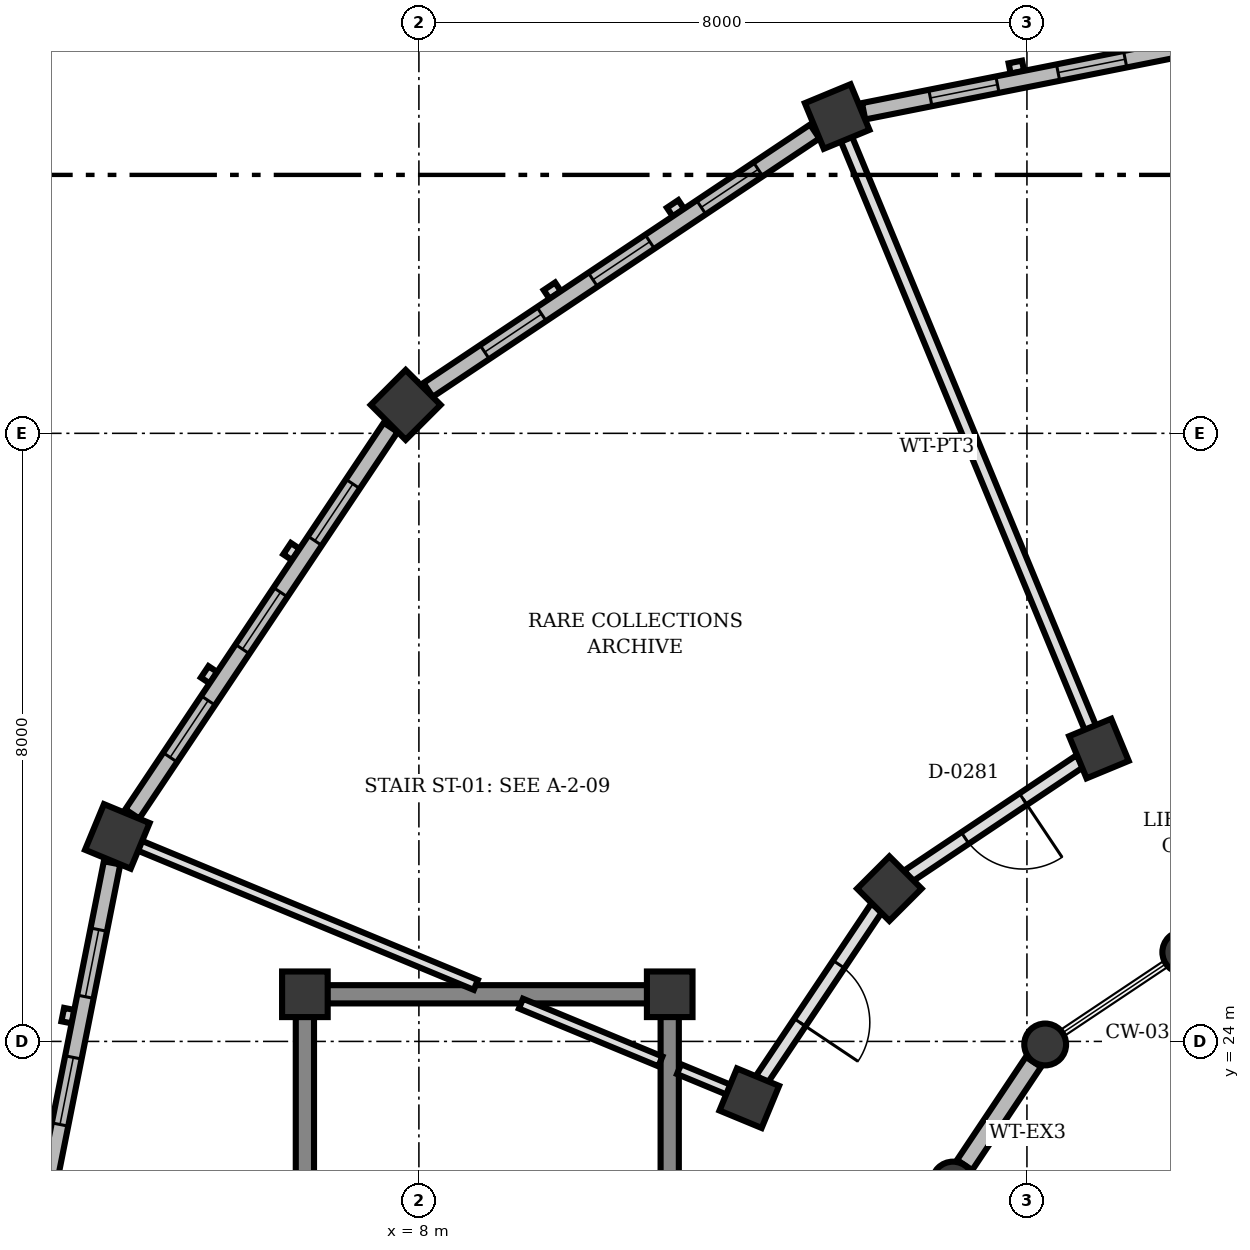
"""IFC4 building model, lengths in metres.
Left out: names, types, materials, properties, quantities, classifications, styles, units other than length and angle.
Written with IfcOpenShell. Run it as: python <this file> out.ifc"""

import sys

from ifc_helpers import new_model, si_unit, direction, frame, frame_2d, origin, origin_2d, place, context, subcontext, project, spatial, rectangle, circle, extrude, element, fill, save


model = new_model("IFC4")
c1 = context("Model", 3, precision=1e-05, world=origin(), true_north=direction((0.0, 1.0)))
c2 = subcontext(c1, "Body", "Model", "MODEL_VIEW")
j1 = project(units=[si_unit("LENGTHUNIT", "METRE"), si_unit("PLANEANGLEUNIT", "RADIAN")], contexts=[c1])
p1 = place(None, origin())
s1 = spatial("IfcSite", under=j1, at=p1, CompositionType="ELEMENT")
p2 = place(p1, origin())
s2 = spatial("IfcBuilding", under=s1, at=p2, CompositionType="ELEMENT")
p3 = place(p2, origin())
s3 = spatial("IfcBuildingStorey", under=s2, at=p3, CompositionType="ELEMENT", Elevation=0.0)
for number, where, z_axis, x_axis in (
    (1, (11.3, 24.62, 0.0), (0.0, 0.0, 1.0), (1.0, 0.0, 0.0)),
    (2, (6.5, 24.62, 0.0), (0.0, 0.0, 1.0), (1.0, 0.0, 0.0)),
):
    element("IfcColumn", number, at=place(p3, frame(where, z_axis=z_axis, x_axis=x_axis)), inside=s3, PredefinedType="COLUMN", context=c2, shape_type="SweptSolid", body=[
        extrude(rectangle(XDim=0.6, YDim=0.6, at=origin_2d()), origin(), (0.0, 0.0, 1.0), 4.5),
    ])
for number, where, z_axis, x_axis in (
    (3, (18.057, 25.174, 0.0), (0.0, 0.0, 1.0), (1.0, 0.0, 0.0)),
    (4, (16.24, 23.96, 0.0), (0.0, 0.0, 1.0), (1.0, 0.0, 0.0)),
    (5, (15.026, 22.143, 0.0), (0.0, 0.0, 1.0), (1.0, 0.0, 0.0)),
):
    element("IfcColumn", number, at=place(p3, frame(where, z_axis=z_axis, x_axis=x_axis)), inside=s3, PredefinedType="COLUMN", context=c2, shape_type="SweptSolid", body=[
        extrude(circle(Radius=0.275, at=origin_2d()), origin(), (0.0, 0.0, 1.0), 4.5),
    ])
for number, where, z_axis, x_axis in (
    (6, (16.947, 27.853, 0.0), (0.0, 0.0, 1.0), (-0.383, 0.924, 0.0)),
    (7, (14.19, 26.01, 0.0), (0.0, 0.0, 1.0), (-0.707, 0.707, 0.0)),
    (8, (12.347, 23.253, 0.0), (0.0, 0.0, 1.0), (-0.924, 0.383, 0.0)),
):
    element("IfcColumn", number, at=place(p3, frame(where, z_axis=z_axis, x_axis=x_axis)), inside=s3, PredefinedType="COLUMN", context=c2, shape_type="SweptSolid", body=[
        extrude(rectangle(XDim=0.6, YDim=0.6, at=origin_2d()), origin(), (0.0, 0.0, 1.0), 4.5),
    ])
for number, where, z_axis, x_axis in (
    (9, (13.503, 36.168, 0.0), (0.0, 0.0, 1.0), (-0.383, 0.924, 0.0)),
    (10, (7.826, 32.374, 0.0), (0.0, 0.0, 1.0), (-0.707, 0.707, 0.0)),
    (11, (4.032, 26.697, 0.0), (0.0, 0.0, 1.0), (-0.924, 0.383, 0.0)),
):
    element("IfcColumn", number, at=place(p3, frame(where, z_axis=z_axis, x_axis=x_axis)), inside=s3, PredefinedType="COLUMN", context=c2, shape_type="SweptSolid", body=[
        extrude(rectangle(XDim=0.65, YDim=0.65, at=origin_2d()), origin(), (0.0, 0.0, 1.0), 4.5),
    ])
p4 = place(p3, frame((13.851, 36.237, 0.0), z_axis=(0.0, 0.0, 1.0), x_axis=(0.98077967596, 0.19511849534, 0.0)))
e12 = element("IfcWall", 12, at=p4, inside=s3, PredefinedType="SOLIDWALL", context=c2, shape_type="SweptSolid", body=[
    extrude(rectangle(XDim=6.119, YDim=0.22, at=frame_2d((3.059, 0.0))), origin(), (0.0, 0.0, 1.0), 3.55),
])
p5 = place(p4, frame((0.896, 0.0, 0.85)))
e13 = element("IfcOpeningElement", 13, at=p5, cuts=e12, PredefinedType="OPENING", context=c2, shape_type="SweptSolid", body=[
    extrude(rectangle(XDim=0.9, YDim=1.4, at=frame_2d((0.45, 0.7))), frame((0.0, 0.12, 0.0), z_axis=(0.0, -1.0, 0.0), x_axis=(1.0, 0.0, 0.0)), (0.0, 0.0, 1.0), 0.24),
])
p6 = place(p4, frame((2.609, 0.0, 0.85)))
e14 = element("IfcOpeningElement", 14, at=p6, cuts=e12, PredefinedType="OPENING", context=c2, shape_type="SweptSolid", body=[
    extrude(rectangle(XDim=0.9, YDim=1.4, at=frame_2d((0.45, 0.7))), frame((0.0, 0.12, 0.0), z_axis=(0.0, -1.0, 0.0), x_axis=(1.0, 0.0, 0.0)), (0.0, 0.0, 1.0), 0.24),
])
p7 = place(p4, frame((4.323, 0.0, 0.85)))
e15 = element("IfcOpeningElement", 15, at=p7, cuts=e12, PredefinedType="OPENING", context=c2, shape_type="SweptSolid", body=[
    extrude(rectangle(XDim=0.9, YDim=1.4, at=frame_2d((0.45, 0.7))), frame((0.0, 0.12, 0.0), z_axis=(0.0, -1.0, 0.0), x_axis=(1.0, 0.0, 0.0)), (0.0, 0.0, 1.0), 0.24),
])
p8 = place(p3, frame((8.121, 32.571, 0.0), z_axis=(0.0, 0.0, 1.0), x_axis=(0.83139901156, 0.555675879967, 0.0)))
e16 = element("IfcWall", 16, at=p8, inside=s3, PredefinedType="SOLIDWALL", context=c2, shape_type="SweptSolid", body=[
    extrude(rectangle(XDim=6.118, YDim=0.22, at=frame_2d((3.059, 0.0))), origin(), (0.0, 0.0, 1.0), 3.55),
])
p9 = place(p8, frame((0.896, 0.0, 0.85)))
e17 = element("IfcOpeningElement", 17, at=p9, cuts=e16, PredefinedType="OPENING", context=c2, shape_type="SweptSolid", body=[
    extrude(rectangle(XDim=0.9, YDim=1.4, at=frame_2d((0.45, 0.7))), frame((0.0, 0.12, 0.0), z_axis=(0.0, -1.0, 0.0), x_axis=(1.0, 0.0, 0.0)), (0.0, 0.0, 1.0), 0.24),
])
p10 = place(p8, frame((2.609, 0.0, 0.85)))
e18 = element("IfcOpeningElement", 18, at=p10, cuts=e16, PredefinedType="OPENING", context=c2, shape_type="SweptSolid", body=[
    extrude(rectangle(XDim=0.9, YDim=1.4, at=frame_2d((0.45, 0.7))), frame((0.0, 0.12, 0.0), z_axis=(0.0, -1.0, 0.0), x_axis=(1.0, 0.0, 0.0)), (0.0, 0.0, 1.0), 0.24),
])
p11 = place(p8, frame((4.323, 0.0, 0.85)))
e19 = element("IfcOpeningElement", 19, at=p11, cuts=e16, PredefinedType="OPENING", context=c2, shape_type="SweptSolid", body=[
    extrude(rectangle(XDim=0.9, YDim=1.4, at=frame_2d((0.45, 0.7))), frame((0.0, 0.12, 0.0), z_axis=(0.0, -1.0, 0.0), x_axis=(1.0, 0.0, 0.0)), (0.0, 0.0, 1.0), 0.24),
])
p12 = place(p3, frame((4.229, 26.992, 0.0), z_axis=(0.0, 0.0, 1.0), x_axis=(0.555657446161, 0.831411331728, 0.0)))
e20 = element("IfcWall", 20, at=p12, inside=s3, PredefinedType="SOLIDWALL", context=c2, shape_type="SweptSolid", body=[
    extrude(rectangle(XDim=6.119, YDim=0.22, at=frame_2d((3.059, 0.0))), origin(), (0.0, 0.0, 1.0), 3.55),
])
p13 = place(p12, frame((0.896, 0.0, 0.85)))
e21 = element("IfcOpeningElement", 21, at=p13, cuts=e20, PredefinedType="OPENING", context=c2, shape_type="SweptSolid", body=[
    extrude(rectangle(XDim=0.9, YDim=1.4, at=frame_2d((0.45, 0.7))), frame((0.0, 0.12, 0.0), z_axis=(0.0, -1.0, 0.0), x_axis=(1.0, 0.0, 0.0)), (0.0, 0.0, 1.0), 0.24),
])
p14 = place(p12, frame((2.609, 0.0, 0.85)))
e22 = element("IfcOpeningElement", 22, at=p14, cuts=e20, PredefinedType="OPENING", context=c2, shape_type="SweptSolid", body=[
    extrude(rectangle(XDim=0.9, YDim=1.4, at=frame_2d((0.45, 0.7))), frame((0.0, 0.12, 0.0), z_axis=(0.0, -1.0, 0.0), x_axis=(1.0, 0.0, 0.0)), (0.0, 0.0, 1.0), 0.24),
])
p15 = place(p12, frame((4.323, 0.0, 0.85)))
e23 = element("IfcOpeningElement", 23, at=p15, cuts=e20, PredefinedType="OPENING", context=c2, shape_type="SweptSolid", body=[
    extrude(rectangle(XDim=0.9, YDim=1.4, at=frame_2d((0.45, 0.7))), frame((0.0, 0.12, 0.0), z_axis=(0.0, -1.0, 0.0), x_axis=(1.0, 0.0, 0.0)), (0.0, 0.0, 1.0), 0.24),
])
p16 = place(p3, frame((16.086, 23.73, 0.0), z_axis=(0.0, 0.0, 1.0), x_axis=(-0.555287078904, -0.83165874011, 0.0)))
e24 = element("IfcWall", 24, at=p16, inside=s3, PredefinedType="SOLIDWALL", context=c2, shape_type="SweptSolid", body=[
    extrude(rectangle(XDim=1.632, YDim=0.24, at=frame_2d((0.816, 0.0))), origin(), (0.0, 0.0, 1.0), 3.55),
])
p17 = place(p3, frame((2.769, 20.348, 0.0), z_axis=(0.0, 0.0, 1.0), x_axis=(0.195110859746, 0.980781194971, 0.0)))
e25 = element("IfcWall", 25, at=p17, inside=s3, PredefinedType="SOLIDWALL", context=c2, shape_type="SweptSolid", body=[
    extrude(rectangle(XDim=6.119, YDim=0.22, at=frame_2d((3.06, 0.0))), origin(), (0.0, 0.0, 1.0), 3.55),
])
p18 = place(p17, frame((0.896, 0.0, 0.85)))
e26 = element("IfcOpeningElement", 26, at=p18, cuts=e25, PredefinedType="OPENING", context=c2, shape_type="SweptSolid", body=[
    extrude(rectangle(XDim=0.9, YDim=1.4, at=frame_2d((0.45, 0.7))), frame((0.0, 0.12, 0.0), z_axis=(0.0, -1.0, 0.0), x_axis=(1.0, 0.0, 0.0)), (0.0, 0.0, 1.0), 0.24),
])
p19 = place(p17, frame((2.609, 0.0, 0.85)))
e27 = element("IfcOpeningElement", 27, at=p19, cuts=e25, PredefinedType="OPENING", context=c2, shape_type="SweptSolid", body=[
    extrude(rectangle(XDim=0.9, YDim=1.4, at=frame_2d((0.45, 0.7))), frame((0.0, 0.12, 0.0), z_axis=(0.0, -1.0, 0.0), x_axis=(1.0, 0.0, 0.0)), (0.0, 0.0, 1.0), 0.24),
])
p20 = place(p17, frame((4.323, 0.0, 0.85)))
e28 = element("IfcOpeningElement", 28, at=p20, cuts=e25, PredefinedType="OPENING", context=c2, shape_type="SweptSolid", body=[
    extrude(rectangle(XDim=0.9, YDim=1.4, at=frame_2d((0.45, 0.7))), frame((0.0, 0.12, 0.0), z_axis=(0.0, -1.0, 0.0), x_axis=(1.0, 0.0, 0.0)), (0.0, 0.0, 1.0), 0.24),
])
p21 = place(p3, frame((6.5, 16.192, 0.0), z_axis=(0.0, 0.0, 1.0), x_axis=(0.0, 1.0, 0.0)))
e29 = element("IfcWall", 29, at=p21, inside=s3, PredefinedType="SHEAR", context=c2, shape_type="SweptSolid", body=[
    extrude(rectangle(XDim=8.136, YDim=0.24, at=frame_2d((4.068, 0.0))), origin(), (0.0, 0.0, 1.0), 4.24),
])
p22 = place(p3, frame((11.3, 24.328, 0.0), z_axis=(0.0, 0.0, 1.0), x_axis=(0.0, -1.0, 0.0)))
e30 = element("IfcWall", 30, at=p22, inside=s3, PredefinedType="SHEAR", context=c2, shape_type="SweptSolid", body=[
    extrude(rectangle(XDim=8.136, YDim=0.24, at=frame_2d((4.068, 0.0))), origin(), (0.0, 0.0, 1.0), 4.24),
])
p23 = place(p22, frame((6.244, 0.0, 0.0)))
e31 = element("IfcOpeningElement", 31, at=p23, cuts=e30, PredefinedType="OPENING", context=c2, shape_type="SweptSolid", body=[
    extrude(rectangle(XDim=0.88, YDim=2.1, at=frame_2d((0.44, 1.05))), frame((0.0, 0.13, 0.0), z_axis=(0.0, -1.0, 0.0), x_axis=(1.0, 0.0, 0.0)), (0.0, 0.0, 1.0), 0.26),
])
p24 = place(p3, frame((11.008, 24.62, 0.0), z_axis=(0.0, 0.0, 1.0), x_axis=(-1.0, 0.0, 0.0)))
e32 = element("IfcWall", 32, at=p24, inside=s3, PredefinedType="SHEAR", context=c2, shape_type="SweptSolid", body=[
    extrude(rectangle(XDim=4.216, YDim=0.24, at=frame_2d((2.108, 0.0))), origin(), (0.0, 0.0, 1.0), 4.24),
])
p25 = place(p3, frame((16.836, 28.123, 0.0), z_axis=(0.0, 0.0, 1.0), x_axis=(-0.382780060664, 0.923839501839, 0.0)))
e33 = element("IfcWall", 33, at=p25, inside=s3, PredefinedType="PARTITIONING", context=c2, shape_type="SweptSolid", body=[
    extrude(rectangle(XDim=8.391, YDim=0.16, at=frame_2d((4.196, 0.0))), origin(), (0.0, 0.0, 1.0), 3.552),
])
p26 = place(p3, frame((12.077, 23.364, 0.0), z_axis=(0.0, 0.0, 1.0), x_axis=(-0.923789734747, 0.382900151445, 0.0)))
e34 = element("IfcWall", 34, at=p26, inside=s3, PredefinedType="PARTITIONING", context=c2, shape_type="SweptSolid", body=[
    extrude(rectangle(XDim=0.708, YDim=0.14, at=frame_2d((0.354, 0.0))), origin(), (0.0, 0.0, 1.0), 4.2),
])
p27 = place(p3, frame((11.177, 23.737, 0.0), z_axis=(0.0, 0.0, 1.0), x_axis=(-0.923817443679, 0.382833293686, 0.0)))
e35 = element("IfcWall", 35, at=p27, inside=s3, PredefinedType="PARTITIONING", context=c2, shape_type="SweptSolid", body=[
    extrude(rectangle(XDim=1.985, YDim=0.14, at=frame_2d((0.993, 0.0))), origin(), (0.0, 0.0, 1.0), 4.2),
])
p28 = place(p3, frame((8.749, 24.743, 0.0), z_axis=(0.0, 0.0, 1.0), x_axis=(-0.923842829076, 0.38277203028, 0.0)))
e36 = element("IfcWall", 36, at=p28, inside=s3, PredefinedType="PARTITIONING", context=c2, shape_type="SweptSolid", body=[
    extrude(rectangle(XDim=4.789, YDim=0.14, at=frame_2d((2.395, 0.0))), origin(), (0.0, 0.0, 1.0), 4.2),
])
p29 = place(p3, frame((16.699, 27.688, 0.0), z_axis=(0.0, 0.0, 1.0), x_axis=(-0.831096426298, -0.556128339679, 0.0)))
e37 = element("IfcWall", 37, at=p29, inside=s3, PredefinedType="PARTITIONING", context=c2, shape_type="SweptSolid", body=[
    extrude(rectangle(XDim=2.72, YDim=0.18, at=frame_2d((1.36, 0.0))), origin(), (0.0, 0.0, 1.0), 3.552),
])
p30 = place(p29, frame((0.9, 0.0, 0.0)))
e38 = element("IfcOpeningElement", 38, at=p30, cuts=e37, PredefinedType="OPENING", context=c2, shape_type="SweptSolid", body=[
    extrude(rectangle(XDim=0.92, YDim=2.1, at=frame_2d((0.46, 1.05))), frame((0.0, 0.1, 0.0), z_axis=(0.0, -1.0, 0.0), x_axis=(1.0, 0.0, 0.0)), (0.0, 0.0, 1.0), 0.2),
])
p31 = place(p3, frame((14.025, 25.762, 0.0), z_axis=(0.0, 0.0, 1.0), x_axis=(-0.556128339679, -0.831096426298, 0.0)))
e39 = element("IfcWall", 39, at=p31, inside=s3, PredefinedType="PARTITIONING", context=c2, shape_type="SweptSolid", body=[
    extrude(rectangle(XDim=2.72, YDim=0.18, at=frame_2d((1.36, 0.0))), origin(), (0.0, 0.0, 1.0), 3.552),
])
p32 = place(p31, frame((0.9, 0.0, 0.0)))
e40 = element("IfcOpeningElement", 40, at=p32, cuts=e39, PredefinedType="OPENING", context=c2, shape_type="SweptSolid", body=[
    extrude(rectangle(XDim=0.92, YDim=2.1, at=frame_2d((0.46, 1.05))), frame((0.0, 0.1, 0.0), z_axis=(0.0, -1.0, 0.0), x_axis=(1.0, 0.0, 0.0)), (0.0, 0.0, 1.0), 0.2),
])
p33 = place(p5, origin())
e41 = element("IfcWindow", 41, at=p33, inside=s3, PartitioningType="SINGLE_PANEL", PredefinedType="WINDOW", context=c2, shape_type="SweptSolid", body=[
    extrude(rectangle(XDim=0.9, YDim=1.4, at=frame_2d((0.45, 0.7))), frame((0.0, 0.03, 0.0), z_axis=(0.0, -1.0, 0.0), x_axis=(1.0, 0.0, 0.0)), (0.0, 0.0, 1.0), 0.06),
])
fill(e13, e41)
p34 = place(p6, origin())
e42 = element("IfcWindow", 42, at=p34, inside=s3, PartitioningType="SINGLE_PANEL", PredefinedType="WINDOW", context=c2, shape_type="SweptSolid", body=[
    extrude(rectangle(XDim=0.9, YDim=1.4, at=frame_2d((0.45, 0.7))), frame((0.0, 0.03, 0.0), z_axis=(0.0, -1.0, 0.0), x_axis=(1.0, 0.0, 0.0)), (0.0, 0.0, 1.0), 0.06),
])
fill(e14, e42)
p35 = place(p9, origin())
e43 = element("IfcWindow", 43, at=p35, inside=s3, PartitioningType="SINGLE_PANEL", PredefinedType="WINDOW", context=c2, shape_type="SweptSolid", body=[
    extrude(rectangle(XDim=0.9, YDim=1.4, at=frame_2d((0.45, 0.7))), frame((0.0, 0.03, 0.0), z_axis=(0.0, -1.0, 0.0), x_axis=(1.0, 0.0, 0.0)), (0.0, 0.0, 1.0), 0.06),
])
fill(e17, e43)
p36 = place(p10, origin())
e44 = element("IfcWindow", 44, at=p36, inside=s3, PartitioningType="SINGLE_PANEL", PredefinedType="WINDOW", context=c2, shape_type="SweptSolid", body=[
    extrude(rectangle(XDim=0.9, YDim=1.4, at=frame_2d((0.45, 0.7))), frame((0.0, 0.03, 0.0), z_axis=(0.0, -1.0, 0.0), x_axis=(1.0, 0.0, 0.0)), (0.0, 0.0, 1.0), 0.06),
])
fill(e18, e44)
p37 = place(p11, origin())
e45 = element("IfcWindow", 45, at=p37, inside=s3, PartitioningType="SINGLE_PANEL", PredefinedType="WINDOW", context=c2, shape_type="SweptSolid", body=[
    extrude(rectangle(XDim=0.9, YDim=1.4, at=frame_2d((0.45, 0.7))), frame((0.0, 0.03, 0.0), z_axis=(0.0, -1.0, 0.0), x_axis=(1.0, 0.0, 0.0)), (0.0, 0.0, 1.0), 0.06),
])
fill(e19, e45)
p38 = place(p13, origin())
e46 = element("IfcWindow", 46, at=p38, inside=s3, PartitioningType="SINGLE_PANEL", PredefinedType="WINDOW", context=c2, shape_type="SweptSolid", body=[
    extrude(rectangle(XDim=0.9, YDim=1.4, at=frame_2d((0.45, 0.7))), frame((0.0, 0.03, 0.0), z_axis=(0.0, -1.0, 0.0), x_axis=(1.0, 0.0, 0.0)), (0.0, 0.0, 1.0), 0.06),
])
fill(e21, e46)
p39 = place(p14, origin())
e47 = element("IfcWindow", 47, at=p39, inside=s3, PartitioningType="SINGLE_PANEL", PredefinedType="WINDOW", context=c2, shape_type="SweptSolid", body=[
    extrude(rectangle(XDim=0.9, YDim=1.4, at=frame_2d((0.45, 0.7))), frame((0.0, 0.03, 0.0), z_axis=(0.0, -1.0, 0.0), x_axis=(1.0, 0.0, 0.0)), (0.0, 0.0, 1.0), 0.06),
])
fill(e22, e47)
p40 = place(p15, origin())
e48 = element("IfcWindow", 48, at=p40, inside=s3, PartitioningType="SINGLE_PANEL", PredefinedType="WINDOW", context=c2, shape_type="SweptSolid", body=[
    extrude(rectangle(XDim=0.9, YDim=1.4, at=frame_2d((0.45, 0.7))), frame((0.0, 0.03, 0.0), z_axis=(0.0, -1.0, 0.0), x_axis=(1.0, 0.0, 0.0)), (0.0, 0.0, 1.0), 0.06),
])
fill(e23, e48)
p41 = place(p19, origin())
e49 = element("IfcWindow", 49, at=p41, inside=s3, PartitioningType="SINGLE_PANEL", PredefinedType="WINDOW", context=c2, shape_type="SweptSolid", body=[
    extrude(rectangle(XDim=0.9, YDim=1.4, at=frame_2d((0.45, 0.7))), frame((0.0, 0.03, 0.0), z_axis=(0.0, -1.0, 0.0), x_axis=(1.0, 0.0, 0.0)), (0.0, 0.0, 1.0), 0.06),
])
fill(e27, e49)
p42 = place(p20, origin())
e50 = element("IfcWindow", 50, at=p42, inside=s3, PartitioningType="SINGLE_PANEL", PredefinedType="WINDOW", context=c2, shape_type="SweptSolid", body=[
    extrude(rectangle(XDim=0.9, YDim=1.4, at=frame_2d((0.45, 0.7))), frame((0.0, 0.03, 0.0), z_axis=(0.0, -1.0, 0.0), x_axis=(1.0, 0.0, 0.0)), (0.0, 0.0, 1.0), 0.06),
])
fill(e28, e50)
p43 = place(p30, origin())
e51 = element("IfcDoor", 51, at=p43, inside=s3, OperationType="SINGLE_SWING_LEFT", PredefinedType="DOOR", context=c2, shape_type="SweptSolid", body=[
    extrude(rectangle(XDim=0.92, YDim=2.1, at=frame_2d((0.46, 1.05))), frame((0.0, 0.025, 0.0), z_axis=(0.0, -1.0, 0.0), x_axis=(1.0, 0.0, 0.0)), (0.0, 0.0, 1.0), 0.05),
])
fill(e38, e51)
p44 = place(p32, origin())
e52 = element("IfcDoor", 52, at=p44, inside=s3, OperationType="SINGLE_SWING_RIGHT", PredefinedType="DOOR", context=c2, shape_type="SweptSolid", body=[
    extrude(rectangle(XDim=0.92, YDim=2.1, at=frame_2d((0.46, 1.05))), frame((0.0, 0.025, 0.0), z_axis=(0.0, -1.0, 0.0), x_axis=(1.0, 0.0, 0.0)), (0.0, 0.0, 1.0), 0.05),
])
fill(e40, e52)
save(model, sys.argv[1])
